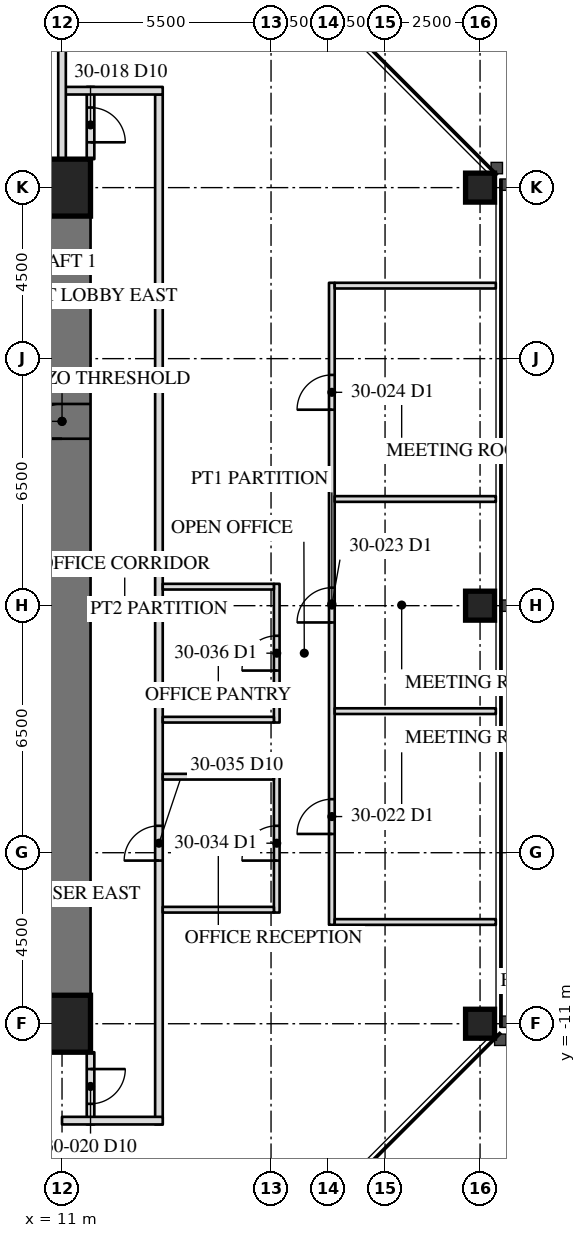
"""IFC4 building model, lengths in metres.
Left out: names, types, materials, properties, quantities, classifications, styles, units other than length and angle.
Written with IfcOpenShell. Run it as: python <this file> out.ifc"""

import sys

from ifc_helpers import new_model, si_unit, direction, frame, frame_2d, origin, origin_2d, place, context, subcontext, project, spatial, rectangle, hollow_rectangle, extrude, element, fill, save


model = new_model("IFC4")
c1 = context("Model", 3, precision=1e-05, world=origin(), true_north=direction((0.0, 1.0)))
c2 = subcontext(c1, "Body", "Model", "MODEL_VIEW")
j1 = project(units=[si_unit("LENGTHUNIT", "METRE"), si_unit("PLANEANGLEUNIT", "RADIAN")], contexts=[c1])
p1 = place(None, origin())
s1 = spatial("IfcSite", under=j1, at=p1, CompositionType="ELEMENT")
p2 = place(p1, origin())
s2 = spatial("IfcBuilding", under=s1, at=p2, CompositionType="ELEMENT")
p3 = place(p2, frame((0.0, 0.0, 129.5)))
s3 = spatial("IfcBuildingStorey", under=s2, at=p3, CompositionType="ELEMENT", Elevation=129.5)
for number, where, z_axis, x_axis in (
    (1, (22.0, -11.0, 0.0), (0.0, 0.0, 1.0), (0.0, 1.0, 0.0)),
    (2, (22.0, 0.0, 0.0), (0.0, 0.0, 1.0), (0.0, 1.0, 0.0)),
    (3, (22.0, 11.0, 0.0), (0.0, 0.0, 1.0), (0.0, 1.0, 0.0)),
):
    element("IfcColumn", number, at=place(p3, frame(where, z_axis=z_axis, x_axis=x_axis)), inside=s3, PredefinedType="COLUMN", context=c2, shape_type="SweptSolid", body=[
        extrude(hollow_rectangle(XDim=0.762, YDim=0.762, WallThickness=0.076, at=origin_2d()), origin(), (0.0, 0.0, 1.0), 4.1),
    ])
p4 = place(p3, frame((11.0, -11.0, 0.0), z_axis=(0.0, 0.0, 1.0), x_axis=(0.0, 1.0, 0.0)))
e4 = element("IfcWall", 4, at=p4, inside=s3, PredefinedType="SHEAR", context=c2, shape_type="SweptSolid", body=[
    extrude(rectangle(XDim=22.0, YDim=1.5, at=frame_2d((11.0, 0.0))), origin(), (0.0, 0.0, 1.0), 4.1),
])
p5 = place(p4, frame((15.393, 0.0, 0.0)))
e5 = element("IfcOpeningElement", 5, at=p5, cuts=e4, PredefinedType="OPENING", context=c2, shape_type="SweptSolid", body=[
    extrude(rectangle(XDim=0.915, YDim=2.134, at=frame_2d((0.458, 1.067))), frame((0.0, 0.76, 0.0), z_axis=(0.0, -1.0, 0.0), x_axis=(1.0, 0.0, 0.0)), (0.0, 0.0, 1.0), 1.52),
])
for number, where, z_axis, x_axis in (
    (6, (11.0, 11.0, 0.0), (0.0, 0.0, 1.0), (-1.0, 0.0, 0.0)),
    (7, (6.5, -11.0, 0.0), (0.0, 0.0, 1.0), (1.0, 0.0, 0.0)),
):
    element("IfcWall", number, at=place(p3, frame(where, z_axis=z_axis, x_axis=x_axis)), inside=s3, PredefinedType="SHEAR", context=c2, shape_type="SweptSolid", body=[
        extrude(rectangle(XDim=4.5, YDim=1.5, at=frame_2d((2.25, 0.0))), origin(), (0.0, 0.0, 1.0), 4.1),
    ])
for number, where, z_axis, x_axis in (
    (8, (11.0, 11.0, 0.0), (0.0, 0.0, 1.0), (1.0, 0.0, 0.0)),
    (9, (11.0, -11.0, 0.0), (0.0, 0.0, 1.0), (1.0, 0.0, 0.0)),
):
    element("IfcColumn", number, at=place(p3, frame(where, z_axis=z_axis, x_axis=x_axis)), inside=s3, PredefinedType="COLUMN", context=c2, shape_type="SweptSolid", body=[
        extrude(hollow_rectangle(XDim=1.499, YDim=1.499, WallThickness=0.102, at=origin_2d()), origin(), (0.0, 0.0, 1.0), 4.1),
    ])
p6 = place(p3, frame((13.55, -13.65, 0.0), z_axis=(0.0, 0.0, 1.0), x_axis=(0.0, 1.0, 0.0)))
e10 = element("IfcWall", 10, at=p6, inside=s3, PredefinedType="PARTITIONING", context=c2, shape_type="SweptSolid", body=[
    extrude(rectangle(XDim=27.1, YDim=0.2, at=frame_2d((13.55, 0.0))), origin(), (0.0, 0.0, 1.0), 3.91),
])
p7 = place(p6, frame((6.942, 0.0, 0.0)))
e11 = element("IfcOpeningElement", 11, at=p7, cuts=e10, PredefinedType="OPENING", context=c2, shape_type="SweptSolid", body=[
    extrude(rectangle(XDim=0.915, YDim=2.134, at=frame_2d((0.458, 1.067))), frame((0.0, 0.11, 0.0), z_axis=(0.0, -1.0, 0.0), x_axis=(1.0, 0.0, 0.0)), (0.0, 0.0, 1.0), 0.22),
])
p8 = place(p3, frame((11.75, 11.75, 0.0), z_axis=(0.0, 0.0, 1.0), x_axis=(0.0, 1.0, 0.0)))
e12 = element("IfcWall", 12, at=p8, inside=s3, PredefinedType="PARTITIONING", context=c2, shape_type="SweptSolid", body=[
    extrude(rectangle(XDim=1.9, YDim=0.2, at=frame_2d((0.95, 0.0))), origin(), (0.0, 0.0, 1.0), 3.91),
])
p9 = place(p8, frame((0.442, 0.0, 0.0)))
e13 = element("IfcOpeningElement", 13, at=p9, cuts=e12, PredefinedType="OPENING", context=c2, shape_type="SweptSolid", body=[
    extrude(rectangle(XDim=0.915, YDim=2.134, at=frame_2d((0.458, 1.067))), frame((0.0, 0.11, 0.0), z_axis=(0.0, -1.0, 0.0), x_axis=(1.0, 0.0, 0.0)), (0.0, 0.0, 1.0), 0.22),
])
p10 = place(p3, frame((11.0, 13.55, 0.0), z_axis=(0.0, 0.0, 1.0), x_axis=(1.0, 0.0, 0.0)))
e14 = element("IfcWall", 14, at=p10, inside=s3, PredefinedType="PARTITIONING", context=c2, shape_type="SweptSolid", body=[
    extrude(rectangle(XDim=2.65, YDim=0.2, at=frame_2d((1.325, 0.0))), origin(), (0.0, 0.0, 1.0), 3.91),
])
p11 = place(p3, frame((11.75, -11.75, 0.0), z_axis=(0.0, 0.0, 1.0), x_axis=(0.0, -1.0, 0.0)))
e15 = element("IfcWall", 15, at=p11, inside=s3, PredefinedType="PARTITIONING", context=c2, shape_type="SweptSolid", body=[
    extrude(rectangle(XDim=1.9, YDim=0.2, at=frame_2d((0.95, 0.0))), origin(), (0.0, 0.0, 1.0), 3.91),
])
p12 = place(p11, frame((0.442, 0.0, 0.0)))
e16 = element("IfcOpeningElement", 16, at=p12, cuts=e15, PredefinedType="OPENING", context=c2, shape_type="SweptSolid", body=[
    extrude(rectangle(XDim=0.915, YDim=2.134, at=frame_2d((0.458, 1.067))), frame((0.0, 0.11, 0.0), z_axis=(0.0, -1.0, 0.0), x_axis=(1.0, 0.0, 0.0)), (0.0, 0.0, 1.0), 0.22),
])
p13 = place(p3, frame((11.0, -13.55, 0.0), z_axis=(0.0, 0.0, 1.0), x_axis=(1.0, 0.0, 0.0)))
e17 = element("IfcWall", 17, at=p13, inside=s3, PredefinedType="PARTITIONING", context=c2, shape_type="SweptSolid", body=[
    extrude(rectangle(XDim=2.65, YDim=0.2, at=frame_2d((1.325, 0.0))), origin(), (0.0, 0.0, 1.0), 3.91),
])
p14 = place(p3, frame((11.0, 11.75, 0.0), z_axis=(0.0, 0.0, 1.0), x_axis=(0.0, 1.0, 0.0)))
e18 = element("IfcWall", 18, at=p14, inside=s3, PredefinedType="PARTITIONING", context=c2, shape_type="SweptSolid", body=[
    extrude(rectangle(XDim=10.665, YDim=0.2, at=frame_2d((5.333, 0.0))), origin(), (0.0, 0.0, 1.0), 3.326),
])
p15 = place(p3, frame((18.1, -8.398, 0.0), z_axis=(0.0, 0.0, 1.0), x_axis=(0.0, 1.0, 0.0)))
e19 = element("IfcWall", 19, at=p15, inside=s3, PredefinedType="PARTITIONING", context=c2, shape_type="SweptSolid", body=[
    extrude(rectangle(XDim=16.894, YDim=0.15, at=frame_2d((8.447, 0.0))), origin(), (0.0, 0.0, 1.0), 3.91),
])
p16 = place(p15, frame((2.392, 0.0, 0.0)))
e20 = element("IfcOpeningElement", 20, at=p16, cuts=e19, PredefinedType="OPENING", context=c2, shape_type="SweptSolid", body=[
    extrude(rectangle(XDim=0.915, YDim=2.134, at=frame_2d((0.458, 1.067))), frame((0.0, 0.085, 0.0), z_axis=(0.0, -1.0, 0.0), x_axis=(1.0, 0.0, 0.0)), (0.0, 0.0, 1.0), 0.17),
])
p17 = place(p15, frame((7.957, 0.0, 0.0)))
e21 = element("IfcOpeningElement", 21, at=p17, cuts=e19, PredefinedType="OPENING", context=c2, shape_type="SweptSolid", body=[
    extrude(rectangle(XDim=0.915, YDim=2.134, at=frame_2d((0.458, 1.067))), frame((0.0, 0.085, 0.0), z_axis=(0.0, -1.0, 0.0), x_axis=(1.0, 0.0, 0.0)), (0.0, 0.0, 1.0), 0.17),
])
p18 = place(p15, frame((13.554, 0.0, 0.0)))
e22 = element("IfcOpeningElement", 22, at=p18, cuts=e19, PredefinedType="OPENING", context=c2, shape_type="SweptSolid", body=[
    extrude(rectangle(XDim=0.915, YDim=2.134, at=frame_2d((0.458, 1.067))), frame((0.0, 0.085, 0.0), z_axis=(0.0, -1.0, 0.0), x_axis=(1.0, 0.0, 0.0)), (0.0, 0.0, 1.0), 0.17),
])
for number, where, z_axis, x_axis in (
    (23, (18.175, -8.323, 0.0), (0.0, 0.0, 1.0), (1.0, 0.0, 0.0)),
    (24, (18.175, -2.775, 0.0), (0.0, 0.0, 1.0), (1.0, 0.0, 0.0)),
    (25, (18.175, 2.807, 0.0), (0.0, 0.0, 1.0), (1.0, 0.0, 0.0)),
    (26, (18.175, 8.421, 0.0), (0.0, 0.0, 1.0), (1.0, 0.0, 0.0)),
):
    element("IfcWall", number, at=place(p3, frame(where, z_axis=z_axis, x_axis=x_axis)), inside=s3, PredefinedType="PARTITIONING", context=c2, shape_type="SweptSolid", body=[
        extrude(rectangle(XDim=4.24, YDim=0.15, at=frame_2d((2.12, 0.0))), origin(), (0.0, 0.0, 1.0), 3.91),
    ])
p19 = place(p3, frame((16.65, -8.075, 0.0), z_axis=(0.0, 0.0, 1.0), x_axis=(0.0, 1.0, 0.0)))
e27 = element("IfcWall", 27, at=p19, inside=s3, PredefinedType="PARTITIONING", context=c2, shape_type="SweptSolid", body=[
    extrude(rectangle(XDim=3.65, YDim=0.15, at=frame_2d((1.825, 0.0))), origin(), (0.0, 0.0, 1.0), 3.91),
])
p20 = place(p19, frame((1.367, 0.0, 0.0)))
e28 = element("IfcOpeningElement", 28, at=p20, cuts=e27, PredefinedType="OPENING", context=c2, shape_type="SweptSolid", body=[
    extrude(rectangle(XDim=0.915, YDim=2.134, at=frame_2d((0.458, 1.067))), frame((0.0, 0.085, 0.0), z_axis=(0.0, -1.0, 0.0), x_axis=(1.0, 0.0, 0.0)), (0.0, 0.0, 1.0), 0.17),
])
for number, where, z_axis, x_axis in (
    (29, (16.575, -8.0, 0.0), (0.0, 0.0, 1.0), (-1.0, 0.0, 0.0)),
    (30, (16.575, -4.5, 0.0), (0.0, 0.0, 1.0), (-1.0, 0.0, 0.0)),
):
    element("IfcWall", number, at=place(p3, frame(where, z_axis=z_axis, x_axis=x_axis)), inside=s3, PredefinedType="PARTITIONING", context=c2, shape_type="SweptSolid", body=[
        extrude(rectangle(XDim=2.925, YDim=0.15, at=frame_2d((1.462, 0.0))), origin(), (0.0, 0.0, 1.0), 3.91),
    ])
p21 = place(p3, frame((16.65, -3.075, 0.0), z_axis=(0.0, 0.0, 1.0), x_axis=(0.0, 1.0, 0.0)))
e31 = element("IfcWall", 31, at=p21, inside=s3, PredefinedType="PARTITIONING", context=c2, shape_type="SweptSolid", body=[
    extrude(rectangle(XDim=3.65, YDim=0.15, at=frame_2d((1.825, 0.0))), origin(), (0.0, 0.0, 1.0), 3.91),
])
p22 = place(p21, frame((1.367, 0.0, 0.0)))
e32 = element("IfcOpeningElement", 32, at=p22, cuts=e31, PredefinedType="OPENING", context=c2, shape_type="SweptSolid", body=[
    extrude(rectangle(XDim=0.915, YDim=2.134, at=frame_2d((0.458, 1.067))), frame((0.0, 0.085, 0.0), z_axis=(0.0, -1.0, 0.0), x_axis=(1.0, 0.0, 0.0)), (0.0, 0.0, 1.0), 0.17),
])
for number, where, z_axis, x_axis in (
    (33, (16.575, -3.0, 0.0), (0.0, 0.0, 1.0), (-1.0, 0.0, 0.0)),
    (34, (16.575, 0.5, 0.0), (0.0, 0.0, 1.0), (-1.0, 0.0, 0.0)),
):
    element("IfcWall", number, at=place(p3, frame(where, z_axis=z_axis, x_axis=x_axis)), inside=s3, PredefinedType="PARTITIONING", context=c2, shape_type="SweptSolid", body=[
        extrude(rectangle(XDim=2.925, YDim=0.15, at=frame_2d((1.462, 0.0))), origin(), (0.0, 0.0, 1.0), 3.91),
    ])
p23 = place(p5, origin())
e35 = element("IfcDoor", 35, at=p23, inside=s3, OperationType="SINGLE_SWING_RIGHT", PredefinedType="DOOR", context=c2, shape_type="SweptSolid", body=[
    extrude(rectangle(XDim=0.915, YDim=2.134, at=frame_2d((0.458, 1.067))), frame((0.0, -0.675, 0.0), z_axis=(0.0, -1.0, 0.0), x_axis=(1.0, 0.0, 0.0)), (0.0, 0.0, 1.0), 0.05),
])
fill(e5, e35)
p24 = place(p9, frame((0.915, 0.0, 0.0), z_axis=(0.0, 0.0, 1.0), x_axis=(-1.0, 0.0, 0.0)))
e36 = element("IfcDoor", 36, at=p24, inside=s3, OperationType="SINGLE_SWING_LEFT", PredefinedType="DOOR", context=c2, shape_type="SweptSolid", body=[
    extrude(rectangle(XDim=0.915, YDim=2.134, at=frame_2d((0.458, 1.067))), frame((0.0, 0.025, 0.0), z_axis=(0.0, -1.0, 0.0), x_axis=(1.0, 0.0, 0.0)), (0.0, 0.0, 1.0), 0.05),
])
fill(e13, e36)
p25 = place(p12, origin())
e37 = element("IfcDoor", 37, at=p25, inside=s3, OperationType="SINGLE_SWING_LEFT", PredefinedType="DOOR", context=c2, shape_type="SweptSolid", body=[
    extrude(rectangle(XDim=0.915, YDim=2.134, at=frame_2d((0.458, 1.067))), frame((0.0, 0.025, 0.0), z_axis=(0.0, -1.0, 0.0), x_axis=(1.0, 0.0, 0.0)), (0.0, 0.0, 1.0), 0.05),
])
fill(e16, e37)
p26 = place(p16, origin())
e38 = element("IfcDoor", 38, at=p26, inside=s3, OperationType="SINGLE_SWING_LEFT", PredefinedType="DOOR", context=c2, shape_type="SweptSolid", body=[
    extrude(rectangle(XDim=0.915, YDim=2.134, at=frame_2d((0.458, 1.067))), frame((0.0, 0.025, 0.0), z_axis=(0.0, -1.0, 0.0), x_axis=(1.0, 0.0, 0.0)), (0.0, 0.0, 1.0), 0.05),
])
fill(e20, e38)
p27 = place(p17, origin())
e39 = element("IfcDoor", 39, at=p27, inside=s3, OperationType="SINGLE_SWING_LEFT", PredefinedType="DOOR", context=c2, shape_type="SweptSolid", body=[
    extrude(rectangle(XDim=0.915, YDim=2.134, at=frame_2d((0.458, 1.067))), frame((0.0, 0.025, 0.0), z_axis=(0.0, -1.0, 0.0), x_axis=(1.0, 0.0, 0.0)), (0.0, 0.0, 1.0), 0.05),
])
fill(e21, e39)
p28 = place(p18, origin())
e40 = element("IfcDoor", 40, at=p28, inside=s3, OperationType="SINGLE_SWING_LEFT", PredefinedType="DOOR", context=c2, shape_type="SweptSolid", body=[
    extrude(rectangle(XDim=0.915, YDim=2.134, at=frame_2d((0.458, 1.067))), frame((0.0, 0.025, 0.0), z_axis=(0.0, -1.0, 0.0), x_axis=(1.0, 0.0, 0.0)), (0.0, 0.0, 1.0), 0.05),
])
fill(e22, e40)
p29 = place(p20, origin())
e41 = element("IfcDoor", 41, at=p29, inside=s3, OperationType="SINGLE_SWING_LEFT", PredefinedType="DOOR", context=c2, shape_type="SweptSolid", body=[
    extrude(rectangle(XDim=0.915, YDim=2.134, at=frame_2d((0.458, 1.067))), frame((0.0, 0.025, 0.0), z_axis=(0.0, -1.0, 0.0), x_axis=(1.0, 0.0, 0.0)), (0.0, 0.0, 1.0), 0.05),
])
fill(e28, e41)
p30 = place(p7, origin())
e42 = element("IfcDoor", 42, at=p30, inside=s3, OperationType="SINGLE_SWING_LEFT", PredefinedType="DOOR", context=c2, shape_type="SweptSolid", body=[
    extrude(rectangle(XDim=0.915, YDim=2.134, at=frame_2d((0.458, 1.067))), frame((0.0, 0.025, 0.0), z_axis=(0.0, -1.0, 0.0), x_axis=(1.0, 0.0, 0.0)), (0.0, 0.0, 1.0), 0.05),
])
fill(e11, e42)
p31 = place(p22, origin())
e43 = element("IfcDoor", 43, at=p31, inside=s3, OperationType="SINGLE_SWING_LEFT", PredefinedType="DOOR", context=c2, shape_type="SweptSolid", body=[
    extrude(rectangle(XDim=0.915, YDim=2.134, at=frame_2d((0.458, 1.067))), frame((0.0, 0.025, 0.0), z_axis=(0.0, -1.0, 0.0), x_axis=(1.0, 0.0, 0.0)), (0.0, 0.0, 1.0), 0.05),
])
fill(e32, e43)
save(model, sys.argv[1])
